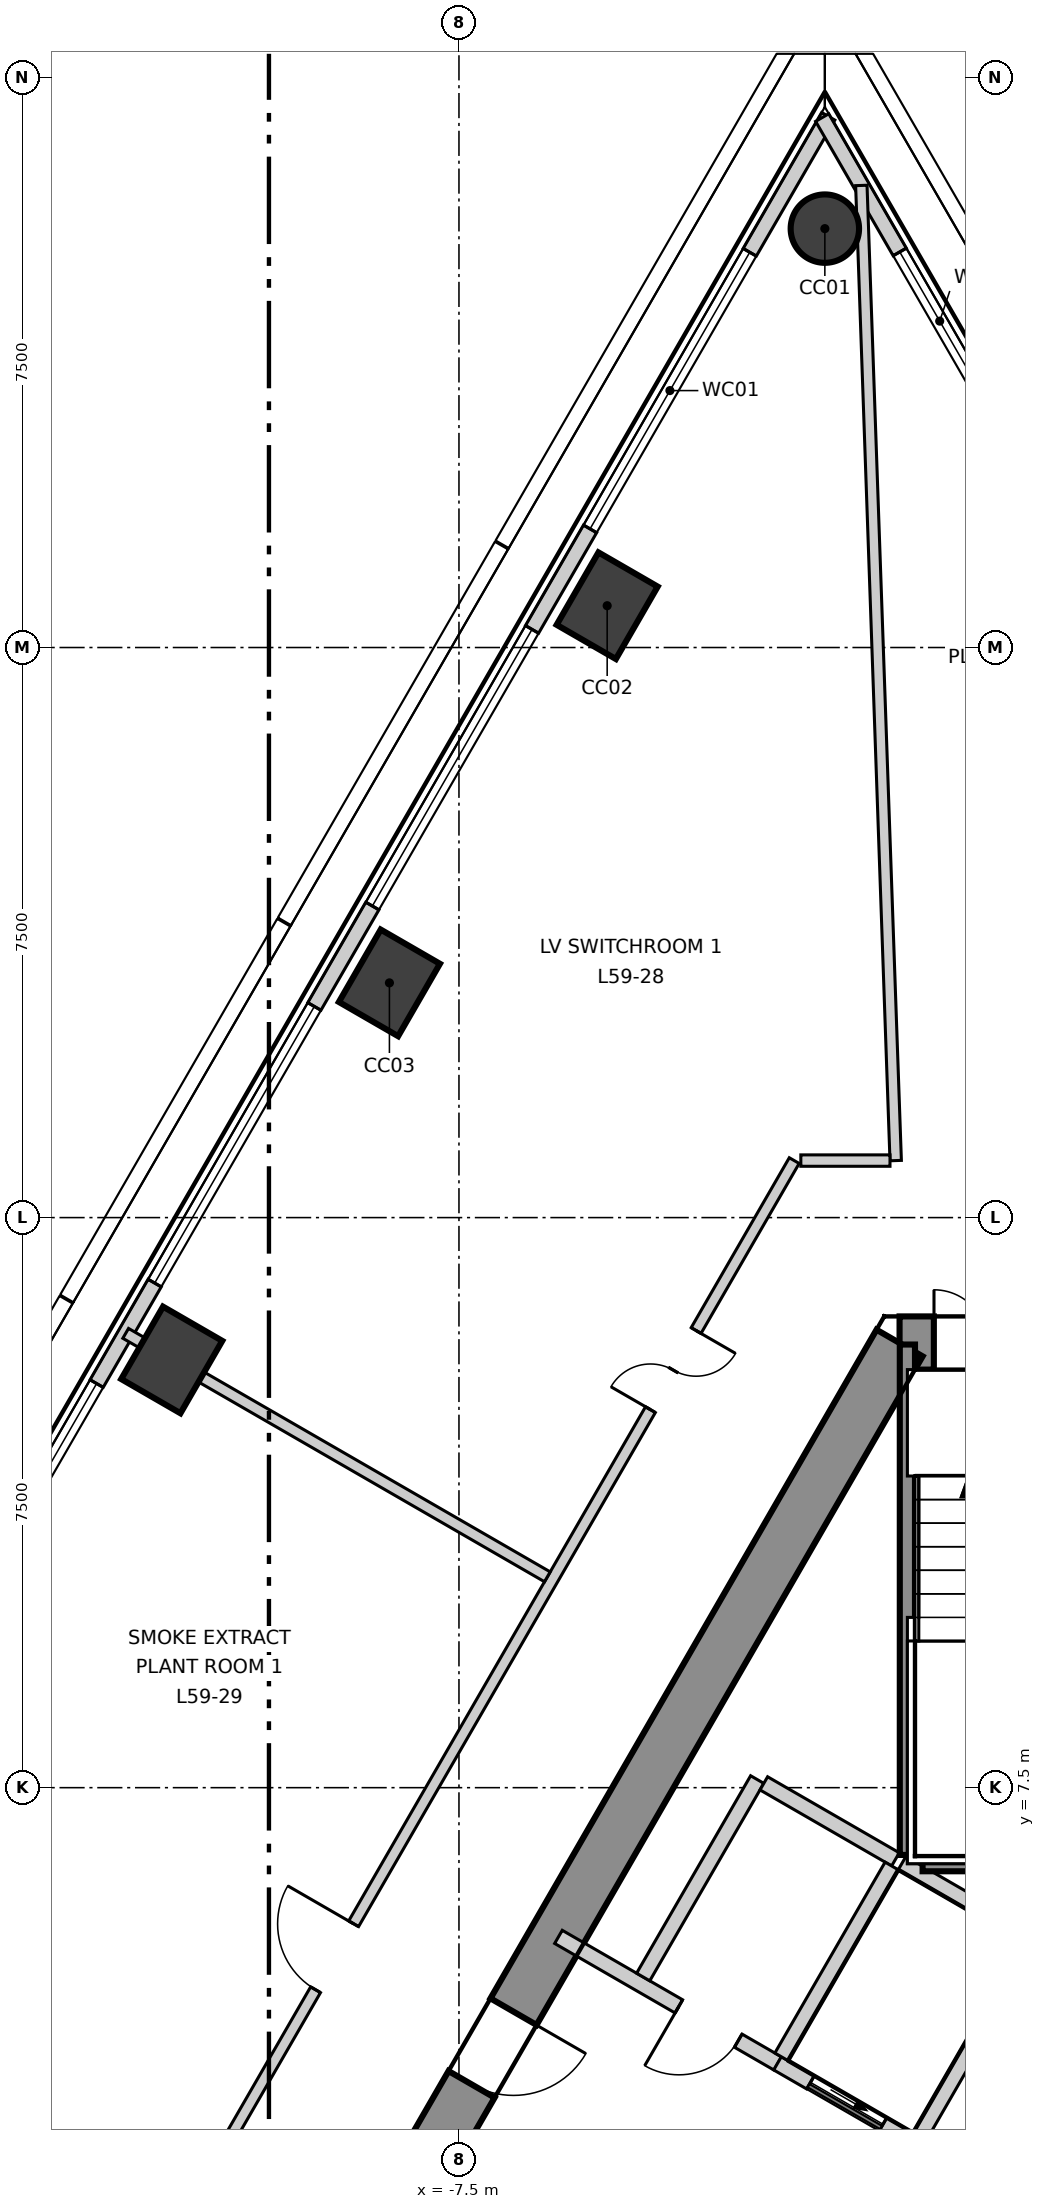
"""IFC4 building model, lengths in metres.
Left out: names, types, materials, properties, quantities, classifications, styles, units other than length and angle.
Written with IfcOpenShell. Run it as: python <this file> out.ifc"""

import sys

from ifc_helpers import new_model, si_unit, direction, frame, frame_2d, origin, origin_2d, place, context, subcontext, project, spatial, polyline, rectangle, circle, outline, extrude, element, fill, save


model = new_model("IFC4")
c1 = context("Model", 3, precision=1e-05, world=origin(), true_north=direction((0.0, 1.0)))
c2 = subcontext(c1, "Body", "Model", "MODEL_VIEW")
j1 = project(units=[si_unit("LENGTHUNIT", "METRE"), si_unit("PLANEANGLEUNIT", "RADIAN")], contexts=[c1])
p1 = place(None, origin())
s1 = spatial("IfcSite", under=j1, at=p1, CompositionType="ELEMENT")
p2 = place(p1, origin())
s2 = spatial("IfcBuilding", under=s1, at=p2, CompositionType="ELEMENT")
p3 = place(p2, frame((0.0, 0.0, 251.3)))
s3 = spatial("IfcBuildingStorey", under=s2, at=p3, CompositionType="ELEMENT", Elevation=251.3)
p4 = place(p3, frame((1.703, 13.35, -0.3), z_axis=(0.0, 0.0, 1.0), x_axis=(-1.0, 0.0, 0.0)))
e1 = element("IfcWall", 1, at=p4, inside=s3, PredefinedType="SHEAR", context=c2, shape_type="SweptSolid", body=[
    extrude(outline(polyline([(-0.202, -0.35), (1.703, -0.35), (3.608, -0.35), (3.204, 0.35), (1.703, 0.35), (0.202, 0.35), (-0.202, -0.35)])), origin(), (0.0, 0.0, 1.0), 4.2),
])
p5 = place(p4, frame((1.553, 0.0, 0.3)))
e2 = element("IfcOpeningElement", 2, at=p5, cuts=e1, PredefinedType="OPENING", context=c2, shape_type="SweptSolid", body=[
    extrude(rectangle(XDim=1.4, YDim=2.1, at=frame_2d((0.7, 1.05))), frame((0.0, 0.36, 0.0), z_axis=(0.0, -1.0, 0.0), x_axis=(1.0, 0.0, 0.0)), (0.0, 0.0, 1.0), 0.72),
])
p6 = place(p3, frame((-1.703, 13.35, -0.3), z_axis=(0.0, 0.0, 1.0), x_axis=(-0.500011533395, -0.866018744874, 0.0)))
e3 = element("IfcWall", 3, at=p6, inside=s3, PredefinedType="SHEAR", context=c2, shape_type="SweptSolid", body=[
    extrude(outline(polyline([(-0.202, -0.35), (1.782, -0.35), (3.766, -0.35), (5.75, -0.35), (7.734, -0.35), (9.718, -0.35), (11.702, -0.35), (13.686, -0.35), (15.67, -0.35), (17.654, -0.35), (19.638, -0.35), (21.622, -0.35), (21.218, 0.35), (19.307, 0.35), (17.397, 0.35), (15.486, 0.35), (13.576, 0.35), (11.665, 0.35), (9.755, 0.35), (7.844, 0.35), (5.934, 0.35), (4.023, 0.35), (2.113, 0.35), (0.202, 0.35), (-0.202, -0.35)])), origin(), (0.0, 0.0, 1.0), 4.2),
])
p7 = place(p6, frame((10.16, 0.0, 0.3)))
e4 = element("IfcOpeningElement", 4, at=p7, cuts=e3, PredefinedType="OPENING", context=c2, shape_type="SweptSolid", body=[
    extrude(rectangle(XDim=1.1, YDim=2.1, at=frame_2d((0.55, 1.05))), frame((0.0, 0.36, 0.0), z_axis=(0.0, -1.0, 0.0), x_axis=(1.0, 0.0, 0.0)), (0.0, 0.0, 1.0), 0.72),
])
p8 = place(p3, frame((-2.686, 28.011, -0.3), z_axis=(0.0, 0.0, 1.0), x_axis=(0.5, 0.866025403784, 0.0)))
e5 = element("IfcColumn", 5, at=p8, inside=s3, PredefinedType="COLUMN", context=c2, shape_type="SweptSolid", body=[
    extrude(circle(Radius=0.45, at=origin_2d()), origin(), (0.0, 0.0, 1.0), 4.2),
])
for number, where, z_axis, x_axis in (
    (6, (-5.55, 23.05, -0.3), (0.0, 0.0, 1.0), (0.5, 0.866, 0.0)),
    (7, (-8.415, 18.088, -0.3), (0.0, 0.0, 1.0), (0.5, 0.866, 0.0)),
    (8, (-11.279, 13.127, -0.3), (0.0, 0.0, 1.0), (0.5, 0.866, 0.0)),
):
    element("IfcColumn", number, at=place(p3, frame(where, z_axis=z_axis, x_axis=x_axis)), inside=s3, PredefinedType="COLUMN", context=c2, shape_type="SweptSolid", body=[
        extrude(rectangle(XDim=1.1, YDim=0.9, at=origin_2d()), origin(), (0.0, 0.0, 1.0), 4.2),
    ])
p9 = place(p3, frame((-2.641, 29.489, 0.0), z_axis=(0.0, 0.0, 1.0), x_axis=(-0.500004868955, -0.866022592674, 0.0)))
e9 = element("IfcWall", 9, at=p9, inside=s3, PredefinedType="ELEMENTEDWALL", context=c2, shape_type="SweptSolid", body=[
    extrude(rectangle(XDim=48.416, YDim=0.2, at=frame_2d((24.208, 0.0))), origin(), (0.0, 0.0, 1.0), 3.9),
])
p10 = place(p9, frame((2.067, 0.0, 0.9)))
e10 = element("IfcOpeningElement", 10, at=p10, cuts=e9, PredefinedType="OPENING", context=c2, shape_type="SweptSolid", body=[
    extrude(rectangle(XDim=4.2, YDim=2.5, at=frame_2d((2.1, 1.25))), frame((0.0, 0.11, 0.0), z_axis=(0.0, -1.0, 0.0), x_axis=(1.0, 0.0, 0.0)), (0.0, 0.0, 1.0), 0.22),
])
p11 = place(p9, frame((7.796, 0.0, 0.9)))
e11 = element("IfcOpeningElement", 11, at=p11, cuts=e9, PredefinedType="OPENING", context=c2, shape_type="SweptSolid", body=[
    extrude(rectangle(XDim=4.2, YDim=2.5, at=frame_2d((2.1, 1.25))), frame((0.0, 0.11, 0.0), z_axis=(0.0, -1.0, 0.0), x_axis=(1.0, 0.0, 0.0)), (0.0, 0.0, 1.0), 0.22),
])
p12 = place(p9, frame((13.524, 0.0, 0.9)))
e12 = element("IfcOpeningElement", 12, at=p12, cuts=e9, PredefinedType="OPENING", context=c2, shape_type="SweptSolid", body=[
    extrude(rectangle(XDim=4.2, YDim=2.5, at=frame_2d((2.1, 1.25))), frame((0.0, 0.11, 0.0), z_axis=(0.0, -1.0, 0.0), x_axis=(1.0, 0.0, 0.0)), (0.0, 0.0, 1.0), 0.22),
])
p13 = place(p9, frame((19.253, 0.0, 0.9)))
e13 = element("IfcOpeningElement", 13, at=p13, cuts=e9, PredefinedType="OPENING", context=c2, shape_type="SweptSolid", body=[
    extrude(rectangle(XDim=4.2, YDim=2.5, at=frame_2d((2.1, 1.25))), frame((0.0, 0.11, 0.0), z_axis=(0.0, -1.0, 0.0), x_axis=(1.0, 0.0, 0.0)), (0.0, 0.0, 1.0), 0.22),
])
p14 = place(p9, frame((24.982, 0.0, 0.9)))
e14 = element("IfcOpeningElement", 14, at=p14, cuts=e9, PredefinedType="OPENING", context=c2, shape_type="SweptSolid", body=[
    extrude(rectangle(XDim=4.2, YDim=2.5, at=frame_2d((2.1, 1.25))), frame((0.0, 0.11, 0.0), z_axis=(0.0, -1.0, 0.0), x_axis=(1.0, 0.0, 0.0)), (0.0, 0.0, 1.0), 0.22),
])
p15 = place(p9, frame((30.711, 0.0, 0.9)))
e15 = element("IfcOpeningElement", 15, at=p15, cuts=e9, PredefinedType="OPENING", context=c2, shape_type="SweptSolid", body=[
    extrude(rectangle(XDim=4.2, YDim=2.5, at=frame_2d((2.1, 1.25))), frame((0.0, 0.11, 0.0), z_axis=(0.0, -1.0, 0.0), x_axis=(1.0, 0.0, 0.0)), (0.0, 0.0, 1.0), 0.22),
])
p16 = place(p9, frame((36.439, 0.0, 0.9)))
e16 = element("IfcOpeningElement", 16, at=p16, cuts=e9, PredefinedType="OPENING", context=c2, shape_type="SweptSolid", body=[
    extrude(rectangle(XDim=4.2, YDim=2.5, at=frame_2d((2.1, 1.25))), frame((0.0, 0.11, 0.0), z_axis=(0.0, -1.0, 0.0), x_axis=(1.0, 0.0, 0.0)), (0.0, 0.0, 1.0), 0.22),
])
p17 = place(p9, frame((42.168, 0.0, 0.9)))
e17 = element("IfcOpeningElement", 17, at=p17, cuts=e9, PredefinedType="OPENING", context=c2, shape_type="SweptSolid", body=[
    extrude(rectangle(XDim=4.2, YDim=2.5, at=frame_2d((2.1, 1.25))), frame((0.0, 0.11, 0.0), z_axis=(0.0, -1.0, 0.0), x_axis=(1.0, 0.0, 0.0)), (0.0, 0.0, 1.0), 0.22),
])
p18 = place(p3, frame((0.045, 24.681, 0.0), z_axis=(0.0, 0.0, 1.0), x_axis=(-0.499969493036, 0.866043016272, 0.0)))
e18 = element("IfcWall", 18, at=p18, inside=s3, PredefinedType="ELEMENTEDWALL", context=c2, shape_type="SweptSolid", body=[
    extrude(rectangle(XDim=5.532, YDim=0.2, at=frame_2d((2.766, 0.0))), origin(), (0.0, 0.0, 1.0), 3.9),
])
p19 = place(p18, frame((1.39, 0.0, 0.9)))
e19 = element("IfcOpeningElement", 19, at=p19, cuts=e18, PredefinedType="OPENING", context=c2, shape_type="SweptSolid", body=[
    extrude(rectangle(XDim=2.1, YDim=2.5, at=frame_2d((1.05, 1.25))), frame((0.0, 0.11, 0.0), z_axis=(0.0, -1.0, 0.0), x_axis=(1.0, 0.0, 0.0)), (0.0, 0.0, 1.0), 0.22),
])
p20 = place(p3, frame((-15.184, -5.2, 0.0), z_axis=(0.0, 0.0, 1.0), x_axis=(0.499984831513, 0.866034161138, 0.0)))
e20 = element("IfcWall", 20, at=p20, inside=s3, PredefinedType="PARTITIONING", context=c2, shape_type="SweptSolid", body=[
    extrude(rectangle(XDim=24.191, YDim=0.15, at=frame_2d((12.095, 0.0))), origin(), (0.0, 0.0, 1.0), 3.9),
])
p21 = place(p20, frame((20.408, 0.0, 0.0)))
e21 = element("IfcOpeningElement", 21, at=p21, cuts=e20, PredefinedType="OPENING", context=c2, shape_type="SweptSolid", body=[
    extrude(rectangle(XDim=1.2, YDim=2.1, at=frame_2d((0.6, 1.05))), frame((0.0, 0.085, 0.0), z_axis=(0.0, -1.0, 0.0), x_axis=(1.0, 0.0, 0.0)), (0.0, 0.0, 1.0), 0.17),
])
p22 = place(p20, frame((11.596, 0.0, 0.0)))
e22 = element("IfcOpeningElement", 22, at=p22, cuts=e20, PredefinedType="OPENING", context=c2, shape_type="SweptSolid", body=[
    extrude(rectangle(XDim=1.0, YDim=2.1, at=frame_2d((0.5, 1.05))), frame((0.0, 0.085, 0.0), z_axis=(0.0, -1.0, 0.0), x_axis=(1.0, 0.0, 0.0)), (0.0, 0.0, 1.0), 0.17),
])
p23 = place(p20, frame((2.584, 0.0, 0.0)))
e23 = element("IfcOpeningElement", 23, at=p23, cuts=e20, PredefinedType="OPENING", context=c2, shape_type="SweptSolid", body=[
    extrude(rectangle(XDim=1.2, YDim=2.1, at=frame_2d((0.6, 1.05))), frame((0.0, 0.085, 0.0), z_axis=(0.0, -1.0, 0.0), x_axis=(1.0, 0.0, 0.0)), (0.0, 0.0, 1.0), 0.17),
])
for number, where, z_axis, x_axis in (
    (24, (-17.614, 3.555, 0.0), (0.0, 0.0, 1.0), (0.866, -0.5, 0.0)),
    (25, (-11.885, 13.477, 0.0), (0.0, 0.0, 1.0), (0.866, -0.5, 0.0)),
):
    element("IfcWall", number, at=place(p3, frame(where, z_axis=z_axis, x_axis=x_axis)), inside=s3, PredefinedType="PARTITIONING", context=c2, shape_type="SweptSolid", body=[
        extrude(rectangle(XDim=6.406, YDim=0.15, at=frame_2d((3.203, 0.0))), origin(), (0.0, 0.0, 1.0), 3.9),
    ])
p24 = place(p3, frame((-2.206, 28.579, 0.0), z_axis=(0.0, 0.0, 1.0), x_axis=(0.035222098869, -0.999379509371, 0.0)))
e26 = element("IfcWall", 26, at=p24, inside=s3, PredefinedType="PARTITIONING", context=c2, shape_type="SweptSolid", body=[
    extrude(rectangle(XDim=12.837, YDim=0.15, at=frame_2d((6.418, 0.0))), origin(), (0.0, 0.0, 1.0), 3.3),
])
p25 = place(p3, frame((-3.002, 15.75, 0.0), z_axis=(0.0, 0.0, 1.0), x_axis=(1.0, 0.0, 0.0)))
e27 = element("IfcWall", 27, at=p25, inside=s3, PredefinedType="PARTITIONING", context=c2, shape_type="SweptSolid", body=[
    extrude(rectangle(XDim=1.173, YDim=0.15, at=frame_2d((0.586, 0.0))), origin(), (0.0, 0.0, 1.0), 3.9),
])
p26 = place(p3, frame((-6.191, 5.537, 0.0), z_axis=(0.0, 0.0, 1.0), x_axis=(0.866052607023, -0.499952879648, 0.0)))
e28 = element("IfcWall", 28, at=p26, inside=s3, PredefinedType="SOLIDWALL", context=c2, shape_type="SweptSolid", body=[
    extrude(rectangle(XDim=3.332, YDim=0.2, at=frame_2d((1.666, 0.0))), origin(), (0.0, 0.0, 1.0), 3.9),
])
p27 = place(p26, frame((1.83, 0.0, 0.0)))
e29 = element("IfcOpeningElement", 29, at=p27, cuts=e28, PredefinedType="OPENING", context=c2, shape_type="SweptSolid", body=[
    extrude(rectangle(XDim=0.9, YDim=2.1, at=frame_2d((0.45, 1.05))), frame((0.0, 0.11, 0.0), z_axis=(0.0, -1.0, 0.0), x_axis=(1.0, 0.0, 0.0)), (0.0, 0.0, 1.0), 0.22),
])
p28 = place(p3, frame((-5.076, 5.009, 0.0), z_axis=(0.0, 0.0, 1.0), x_axis=(0.50002537861, 0.866010750942, 0.0)))
e30 = element("IfcWall", 30, at=p28, inside=s3, PredefinedType="SOLIDWALL", context=c2, shape_type="SweptSolid", body=[
    extrude(rectangle(XDim=3.0, YDim=0.2, at=frame_2d((1.5, 0.0))), origin(), (0.0, 0.0, 1.0), 3.9),
])
p29 = place(p3, frame((-3.489, 7.557, 0.0), z_axis=(0.0, 0.0, 1.0), x_axis=(0.866010750942, -0.50002537861, 0.0)))
e31 = element("IfcWall", 31, at=p29, inside=s3, PredefinedType="SOLIDWALL", context=c2, shape_type="SweptSolid", body=[
    extrude(rectangle(XDim=2.0, YDim=0.2, at=frame_2d((1.0, 0.0))), origin(), (0.0, 0.0, 1.0), 3.9),
])
p30 = place(p3, frame((-3.309, 3.873, 0.0), z_axis=(0.0, 0.0, 1.0), x_axis=(0.866098583652, -0.499873227325, 0.0)))
e32 = element("IfcWall", 32, at=p30, inside=s3, PredefinedType="SOLIDWALL", context=c2, shape_type="SweptSolid", body=[
    extrude(rectangle(XDim=2.103, YDim=0.2, at=frame_2d((1.051, 0.0))), origin(), (0.0, 0.0, 1.0), 3.9),
])
p31 = place(p30, frame((0.502, 0.0, 0.0)))
e33 = element("IfcOpeningElement", 33, at=p31, cuts=e32, PredefinedType="OPENING", context=c2, shape_type="SweptSolid", body=[
    extrude(rectangle(XDim=1.1, YDim=2.1, at=frame_2d((0.55, 1.05))), frame((0.0, 0.11, 0.0), z_axis=(0.0, -1.0, 0.0), x_axis=(1.0, 0.0, 0.0)), (0.0, 0.0, 1.0), 0.22),
])
p32 = place(p3, frame((-3.257, 3.959, 0.0), z_axis=(0.0, 0.0, 1.0), x_axis=(0.50012328804, 0.865954211699, 0.0)))
e34 = element("IfcWall", 34, at=p32, inside=s3, PredefinedType="SOLIDWALL", context=c2, shape_type="SweptSolid", body=[
    extrude(rectangle(XDim=2.9, YDim=0.2, at=frame_2d((1.45, 0.0))), origin(), (0.0, 0.0, 1.0), 3.9),
])
p33 = place(p3, frame((-1.67, 6.507, 0.0), z_axis=(0.0, 0.0, 1.0), x_axis=(0.865941441609, -0.500145398563, 0.0)))
e35 = element("IfcWall", 35, at=p33, inside=s3, PredefinedType="SOLIDWALL", context=c2, shape_type="SweptSolid", body=[
    extrude(rectangle(XDim=1.815, YDim=0.2, at=frame_2d((0.908, 0.0))), origin(), (0.0, 0.0, 1.0), 3.9),
])
p34 = place(p3, frame((-1.438, 2.909, 0.0), z_axis=(0.0, 0.0, 1.0), x_axis=(0.499829630636, 0.866123744241, 0.0)))
e36 = element("IfcWall", 36, at=p34, inside=s3, PredefinedType="SOLIDWALL", context=c2, shape_type="SweptSolid", body=[
    extrude(rectangle(XDim=2.761, YDim=0.2, at=frame_2d((1.38, 0.0))), origin(), (0.0, 0.0, 1.0), 3.9),
])
p35 = place(p3, frame((-1.4, 6.5, 0.0), z_axis=(0.0, 0.0, 1.0), x_axis=(1.0, 0.0, 0.0)))
e37 = element("IfcWall", 37, at=p35, inside=s3, PredefinedType="SOLIDWALL", context=c2, shape_type="SweptSolid", body=[
    extrude(rectangle(XDim=2.8, YDim=0.2, at=frame_2d((1.4, 0.0))), origin(), (0.0, 0.0, 1.0), 3.9),
])
p36 = place(p3, frame((-1.6, 6.615, 0.0), z_axis=(0.0, 0.0, 1.0), x_axis=(0.0, 1.0, 0.0)))
e38 = element("IfcWall", 38, at=p36, inside=s3, PredefinedType="SOLIDWALL", context=c2, shape_type="SweptSolid", body=[
    extrude(rectangle(XDim=6.715, YDim=0.2, at=frame_2d((3.357, 0.0))), origin(), (0.0, 0.0, 1.0), 3.9),
])
p37 = place(p10, origin())
e39 = element("IfcWindow", 39, at=p37, inside=s3, PartitioningType="SINGLE_PANEL", PredefinedType="WINDOW", context=c2, shape_type="SweptSolid", body=[
    extrude(rectangle(XDim=4.2, YDim=2.5, at=frame_2d((2.1, 1.25))), frame((0.0, 0.03, 0.0), z_axis=(0.0, -1.0, 0.0), x_axis=(1.0, 0.0, 0.0)), (0.0, 0.0, 1.0), 0.06),
])
fill(e10, e39)
p38 = place(p11, origin())
e40 = element("IfcWindow", 40, at=p38, inside=s3, PartitioningType="SINGLE_PANEL", PredefinedType="WINDOW", context=c2, shape_type="SweptSolid", body=[
    extrude(rectangle(XDim=4.2, YDim=2.5, at=frame_2d((2.1, 1.25))), frame((0.0, 0.03, 0.0), z_axis=(0.0, -1.0, 0.0), x_axis=(1.0, 0.0, 0.0)), (0.0, 0.0, 1.0), 0.06),
])
fill(e11, e40)
p39 = place(p12, origin())
e41 = element("IfcWindow", 41, at=p39, inside=s3, PartitioningType="SINGLE_PANEL", PredefinedType="WINDOW", context=c2, shape_type="SweptSolid", body=[
    extrude(rectangle(XDim=4.2, YDim=2.5, at=frame_2d((2.1, 1.25))), frame((0.0, 0.03, 0.0), z_axis=(0.0, -1.0, 0.0), x_axis=(1.0, 0.0, 0.0)), (0.0, 0.0, 1.0), 0.06),
])
fill(e12, e41)
p40 = place(p13, origin())
e42 = element("IfcWindow", 42, at=p40, inside=s3, PartitioningType="SINGLE_PANEL", PredefinedType="WINDOW", context=c2, shape_type="SweptSolid", body=[
    extrude(rectangle(XDim=4.2, YDim=2.5, at=frame_2d((2.1, 1.25))), frame((0.0, 0.03, 0.0), z_axis=(0.0, -1.0, 0.0), x_axis=(1.0, 0.0, 0.0)), (0.0, 0.0, 1.0), 0.06),
])
fill(e13, e42)
p41 = place(p19, origin())
e43 = element("IfcWindow", 43, at=p41, inside=s3, PartitioningType="SINGLE_PANEL", PredefinedType="WINDOW", context=c2, shape_type="SweptSolid", body=[
    extrude(rectangle(XDim=2.1, YDim=2.5, at=frame_2d((1.05, 1.25))), frame((0.0, 0.03, 0.0), z_axis=(0.0, -1.0, 0.0), x_axis=(1.0, 0.0, 0.0)), (0.0, 0.0, 1.0), 0.06),
])
fill(e19, e43)
p42 = place(p31, origin())
e44 = element("IfcDoor", 44, at=p42, inside=s3, OperationType="SLIDING_TO_LEFT", PredefinedType="DOOR", context=c2, shape_type="SweptSolid", body=[
    extrude(rectangle(XDim=1.1, YDim=2.1, at=frame_2d((0.55, 1.05))), frame((0.0, 0.025, 0.0), z_axis=(0.0, -1.0, 0.0), x_axis=(1.0, 0.0, 0.0)), (0.0, 0.0, 1.0), 0.05),
])
fill(e33, e44)
p43 = place(p27, origin())
e45 = element("IfcDoor", 45, at=p43, inside=s3, OperationType="SINGLE_SWING_LEFT", PredefinedType="DOOR", context=c2, shape_type="SweptSolid", body=[
    extrude(rectangle(XDim=0.9, YDim=2.1, at=frame_2d((0.45, 1.05))), frame((0.0, 0.025, 0.0), z_axis=(0.0, -1.0, 0.0), x_axis=(1.0, 0.0, 0.0)), (0.0, 0.0, 1.0), 0.05),
])
fill(e29, e45)
p44 = place(p21, origin())
e46 = element("IfcDoor", 46, at=p44, inside=s3, OperationType="DOUBLE_DOOR_SINGLE_SWING", PredefinedType="DOOR", context=c2, shape_type="SweptSolid", body=[
    extrude(rectangle(XDim=1.2, YDim=2.1, at=frame_2d((0.6, 1.05))), frame((0.0, 0.025, 0.0), z_axis=(0.0, -1.0, 0.0), x_axis=(1.0, 0.0, 0.0)), (0.0, 0.0, 1.0), 0.05),
])
fill(e21, e46)
p45 = place(p22, origin())
e47 = element("IfcDoor", 47, at=p45, inside=s3, OperationType="SINGLE_SWING_LEFT", PredefinedType="DOOR", context=c2, shape_type="SweptSolid", body=[
    extrude(rectangle(XDim=1.0, YDim=2.1, at=frame_2d((0.5, 1.05))), frame((0.0, 0.025, 0.0), z_axis=(0.0, -1.0, 0.0), x_axis=(1.0, 0.0, 0.0)), (0.0, 0.0, 1.0), 0.05),
])
fill(e22, e47)
p46 = place(p5, origin())
e48 = element("IfcDoor", 48, at=p46, inside=s3, OperationType="DOUBLE_DOOR_SINGLE_SWING", PredefinedType="DOOR", context=c2, shape_type="SweptSolid", body=[
    extrude(rectangle(XDim=1.4, YDim=2.1, at=frame_2d((0.7, 1.05))), frame((0.0, 0.025, 0.0), z_axis=(0.0, -1.0, 0.0), x_axis=(1.0, 0.0, 0.0)), (0.0, 0.0, 1.0), 0.05),
])
fill(e2, e48)
p47 = place(p7, origin())
e49 = element("IfcDoor", 49, at=p47, inside=s3, OperationType="SINGLE_SWING_RIGHT", PredefinedType="DOOR", context=c2, shape_type="SweptSolid", body=[
    extrude(rectangle(XDim=1.1, YDim=2.1, at=frame_2d((0.55, 1.05))), frame((0.0, 0.025, 0.0), z_axis=(0.0, -1.0, 0.0), x_axis=(1.0, 0.0, 0.0)), (0.0, 0.0, 1.0), 0.05),
])
fill(e4, e49)
save(model, sys.argv[1])
